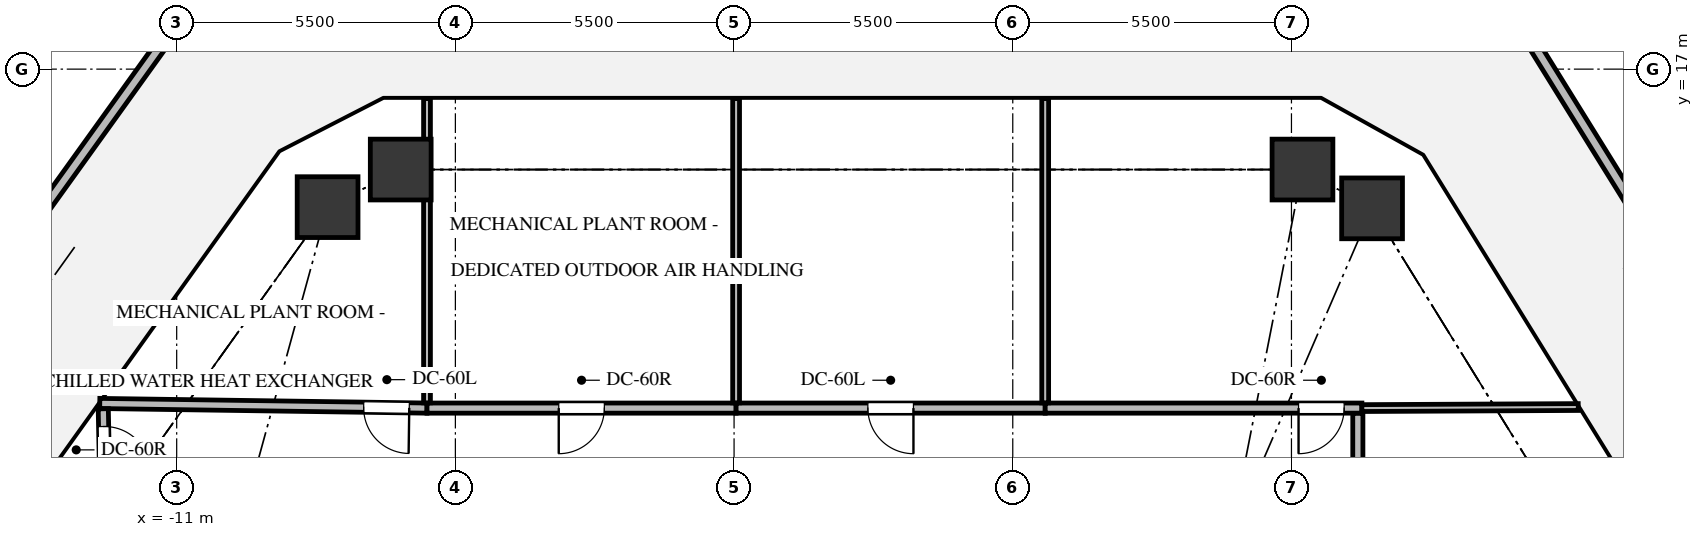
"""IFC4 building model, lengths in metres.
Left out: names, types, materials, properties, quantities, classifications, styles, units other than length and angle.
Written with IfcOpenShell. Run it as: python <this file> out.ifc"""

import sys

from ifc_helpers import new_model, si_unit, direction, frame, frame_2d, origin, origin_2d, place, context, subcontext, project, spatial, rectangle, extrude, source, transform, mapped, element, fill, save


model = new_model("IFC4")
c1 = context("Model", 3, precision=1e-05, world=origin(), true_north=direction((0.0, 1.0)))
c2 = subcontext(c1, "Body", "Model", "MODEL_VIEW")
j1 = project(units=[si_unit("LENGTHUNIT", "METRE"), si_unit("PLANEANGLEUNIT", "RADIAN")], contexts=[c1])
p1 = place(None, origin())
s1 = spatial("IfcSite", under=j1, at=p1, CompositionType="ELEMENT")
p2 = place(p1, origin())
s2 = spatial("IfcBuilding", under=s1, at=p2, CompositionType="ELEMENT")
p3 = place(p2, frame((0.0, 0.0, 150.3)))
s3 = spatial("IfcBuildingStorey", under=s2, at=p3, CompositionType="ELEMENT", Elevation=150.3)
m1 = source(origin(), c2, "Body", "SweptSolid", [
    extrude(rectangle(XDim=1.2, YDim=1.2, at=origin_2d()), origin(), (0.0, 0.0, 1.0), 4.8),
])
for number, where, z_axis, x_axis in (
    (1, (-8.022, 14.276, -0.32), (0.0, 0.0, 1.0), (1.0, 0.0, 0.0)),
    (2, (-6.579, 15.018, -0.32), (0.0, 0.0, 1.0), (1.0, 0.0, 0.0)),
    (3, (11.218, 15.018, -0.32), (0.0, 0.0, 1.0), (1.0, 0.0, 0.0)),
    (4, (12.591, 14.252, -0.32), (0.0, 0.0, 1.0), (1.0, 0.0, 0.0)),
):
    element("IfcColumn", number, at=place(p3, frame(where, z_axis=z_axis, x_axis=x_axis)), inside=s3, PredefinedType="COLUMN", context=c2, shape_type="MappedRepresentation", body=[
        mapped(m1, transform((0.0, 0.0, 0.0), x_axis=(1.0, 0.0, 0.0), y_axis=(0.0, 1.0, 0.0), z_axis=(0.0, 0.0, 1.0), scale=1.0)),
    ])
p4 = place(p3, frame((-21.326, 3.526, 0.0), z_axis=(0.0, 0.0, 1.0), x_axis=(0.583446750611, 0.812151395493, 0.0)))
e5 = element("IfcWall", 5, at=p4, inside=s3, PredefinedType="PARAPET", context=c2, shape_type="SweptSolid", body=[
    extrude(rectangle(XDim=19.587, YDim=0.22, at=frame_2d((9.794, 0.0))), origin(), (0.0, 0.0, 1.0), 1.2),
])
p5 = place(p3, frame((14.612, 19.366, 0.0), z_axis=(0.0, 0.0, 1.0), x_axis=(0.527101579679, -0.849802285652, 0.0)))
e6 = element("IfcWall", 6, at=p5, inside=s3, PredefinedType="PARAPET", context=c2, shape_type="SweptSolid", body=[
    extrude(rectangle(XDim=19.866, YDim=0.22, at=frame_2d((9.933, 0.0))), origin(), (0.0, 0.0, 1.0), 1.2),
])
p6 = place(p3, frame((-6.06, 10.31, 0.0), z_axis=(0.0, 0.0, 1.0), x_axis=(-0.999899519245, 0.014175733232, 0.0)))
e7 = element("IfcWall", 7, at=p6, inside=s3, PredefinedType="SOLIDWALL", context=c2, shape_type="SweptSolid", body=[
    extrude(rectangle(XDim=6.458, YDim=0.2, at=frame_2d((3.229, 0.0))), origin(), (0.0, 0.0, 1.0), 3.662),
])
p7 = place(p6, frame((0.35, 0.0, 0.0)))
e8 = element("IfcOpeningElement", 8, at=p7, cuts=e7, PredefinedType="OPENING", context=c2, shape_type="SweptSolid", body=[
    extrude(rectangle(XDim=0.9, YDim=2.05, at=frame_2d((0.45, 1.025))), frame((0.0, 0.11, 0.0), z_axis=(0.0, -1.0, 0.0), x_axis=(1.0, 0.0, 0.0)), (0.0, 0.0, 1.0), 0.22),
])
p8 = place(p3, frame((0.04, 10.31, 0.0), z_axis=(0.0, 0.0, 1.0), x_axis=(-1.0, 0.0, 0.0)))
e9 = element("IfcWall", 9, at=p8, inside=s3, PredefinedType="SOLIDWALL", context=c2, shape_type="SweptSolid", body=[
    extrude(rectangle(XDim=6.1, YDim=0.2, at=frame_2d((3.05, 0.0))), origin(), (0.0, 0.0, 1.0), 4.028),
])
p9 = place(p8, frame((2.6, 0.0, 0.0)))
e10 = element("IfcOpeningElement", 10, at=p9, cuts=e9, PredefinedType="OPENING", context=c2, shape_type="SweptSolid", body=[
    extrude(rectangle(XDim=0.9, YDim=2.05, at=frame_2d((0.45, 1.025))), frame((0.0, 0.11, 0.0), z_axis=(0.0, -1.0, 0.0), x_axis=(1.0, 0.0, 0.0)), (0.0, 0.0, 1.0), 0.22),
])
p10 = place(p3, frame((6.14, 10.31, 0.0), z_axis=(0.0, 0.0, 1.0), x_axis=(-1.0, 0.0, 0.0)))
e11 = element("IfcWall", 11, at=p10, inside=s3, PredefinedType="SOLIDWALL", context=c2, shape_type="SweptSolid", body=[
    extrude(rectangle(XDim=6.1, YDim=0.2, at=frame_2d((3.05, 0.0))), origin(), (0.0, 0.0, 1.0), 4.028),
])
p11 = place(p10, frame((2.6, 0.0, 0.0)))
e12 = element("IfcOpeningElement", 12, at=p11, cuts=e11, PredefinedType="OPENING", context=c2, shape_type="SweptSolid", body=[
    extrude(rectangle(XDim=0.9, YDim=2.05, at=frame_2d((0.45, 1.025))), frame((0.0, 0.11, 0.0), z_axis=(0.0, -1.0, 0.0), x_axis=(1.0, 0.0, 0.0)), (0.0, 0.0, 1.0), 0.22),
])
p12 = place(p3, frame((12.39, 10.31, 0.0), z_axis=(0.0, 0.0, 1.0), x_axis=(-1.0, 0.0, 0.0)))
e13 = element("IfcWall", 13, at=p12, inside=s3, PredefinedType="SOLIDWALL", context=c2, shape_type="SweptSolid", body=[
    extrude(rectangle(XDim=6.25, YDim=0.2, at=frame_2d((3.125, 0.0))), origin(), (0.0, 0.0, 1.0), 3.662),
])
p13 = place(p12, frame((0.35, 0.0, 0.0)))
e14 = element("IfcOpeningElement", 14, at=p13, cuts=e13, PredefinedType="OPENING", context=c2, shape_type="SweptSolid", body=[
    extrude(rectangle(XDim=0.9, YDim=2.05, at=frame_2d((0.45, 1.025))), frame((0.0, 0.11, 0.0), z_axis=(0.0, -1.0, 0.0), x_axis=(1.0, 0.0, 0.0)), (0.0, 0.0, 1.0), 0.22),
])
p14 = place(p3, frame((12.31, 3.49, 0.0), z_axis=(0.0, 0.0, 1.0), x_axis=(0.0, 1.0, 0.0)))
e15 = element("IfcWall", 15, at=p14, inside=s3, PredefinedType="SOLIDWALL", context=c2, shape_type="SweptSolid", body=[
    extrude(rectangle(XDim=6.716, YDim=0.2, at=frame_2d((3.358, 0.0))), origin(), (0.0, 0.0, 1.0), 4.465),
])
p15 = place(p14, frame((0.35, 0.0, 0.0)))
e16 = element("IfcOpeningElement", 16, at=p15, cuts=e15, PredefinedType="OPENING", context=c2, shape_type="SweptSolid", body=[
    extrude(rectangle(XDim=0.9, YDim=2.05, at=frame_2d((0.45, 1.025))), frame((0.0, 0.11, 0.0), z_axis=(0.0, -1.0, 0.0), x_axis=(1.0, 0.0, 0.0)), (0.0, 0.0, 1.0), 0.22),
])
p16 = place(p3, frame((-12.449, 10.296, 0.0), z_axis=(0.0, 0.0, 1.0), x_axis=(0.020190295039, -0.999796155217, 0.0)))
e17 = element("IfcWall", 17, at=p16, inside=s3, PredefinedType="SOLIDWALL", context=c2, shape_type="SweptSolid", body=[
    extrude(rectangle(XDim=6.808, YDim=0.2, at=frame_2d((3.404, 0.0))), origin(), (0.0, 0.0, 1.0), 3.819),
])
p17 = place(p16, frame((0.35, 0.0, 0.0)))
e18 = element("IfcOpeningElement", 18, at=p17, cuts=e17, PredefinedType="OPENING", context=c2, shape_type="SweptSolid", body=[
    extrude(rectangle(XDim=0.9, YDim=2.05, at=frame_2d((0.45, 1.025))), frame((0.0, 0.11, 0.0), z_axis=(0.0, -1.0, 0.0), x_axis=(1.0, 0.0, 0.0)), (0.0, 0.0, 1.0), 0.22),
])
for number, where, z_axis, x_axis in (
    (19, (-6.06, 16.418, 0.0), (0.0, 0.0, 1.0), (0.0, -1.0, 0.0)),
    (20, (0.04, 16.418, 0.0), (0.0, 0.0, 1.0), (0.0, -1.0, 0.0)),
    (21, (6.14, 16.418, 0.0), (0.0, 0.0, 1.0), (0.0, -1.0, 0.0)),
):
    element("IfcWall", number, at=place(p3, frame(where, z_axis=z_axis, x_axis=x_axis)), inside=s3, PredefinedType="PARTITIONING", context=c2, shape_type="SweptSolid", body=[
        extrude(rectangle(XDim=6.004, YDim=0.135, at=frame_2d((3.002, 0.0))), origin(), (0.0, 0.0, 1.0), 3.819),
    ])
p18 = place(p3, frame((16.66, 10.331, 0.0), z_axis=(0.0, 0.0, 1.0), x_axis=(-0.999988189448, -0.004860140437, 0.0)))
e22 = element("IfcWall", 22, at=p18, inside=s3, PredefinedType="PARTITIONING", context=c2, shape_type="SweptSolid", body=[
    extrude(rectangle(XDim=4.27, YDim=0.135, at=frame_2d((2.135, 0.0))), origin(), (0.0, 0.0, 1.0), 3.819),
])
m2 = source(origin(), c2, "Body", "SweptSolid", [
    extrude(rectangle(XDim=0.9, YDim=2.05, at=frame_2d((0.45, 1.025))), frame((0.0, 0.025, 0.0), z_axis=(0.0, -1.0, 0.0), x_axis=(1.0, 0.0, 0.0)), (0.0, 0.0, 1.0), 0.05),
])
p19 = place(p7, origin())
e23 = element("IfcDoor", 23, at=p19, inside=s3, OperationType="SINGLE_SWING_LEFT", PredefinedType="DOOR", context=c2, shape_type="MappedRepresentation", body=[
    mapped(m2, transform((0.0, 0.0, 0.0), x_axis=(1.0, 0.0, 0.0), y_axis=(0.0, 1.0, 0.0), z_axis=(0.0, 0.0, 1.0), scale=1.0)),
])
fill(e8, e23)
m3 = source(origin(), c2, "Body", "SweptSolid", [
    extrude(rectangle(XDim=0.9, YDim=2.05, at=frame_2d((0.45, 1.025))), frame((0.0, 0.025, 0.0), z_axis=(0.0, -1.0, 0.0), x_axis=(1.0, 0.0, 0.0)), (0.0, 0.0, 1.0), 0.05),
])
p20 = place(p9, origin())
e24 = element("IfcDoor", 24, at=p20, inside=s3, OperationType="SINGLE_SWING_RIGHT", PredefinedType="DOOR", context=c2, shape_type="MappedRepresentation", body=[
    mapped(m3, transform((0.0, 0.0, 0.0), x_axis=(1.0, 0.0, 0.0), y_axis=(0.0, 1.0, 0.0), z_axis=(0.0, 0.0, 1.0), scale=1.0)),
])
fill(e10, e24)
p21 = place(p11, origin())
e25 = element("IfcDoor", 25, at=p21, inside=s3, OperationType="SINGLE_SWING_LEFT", PredefinedType="DOOR", context=c2, shape_type="MappedRepresentation", body=[
    mapped(m2, transform((0.0, 0.0, 0.0), x_axis=(1.0, 0.0, 0.0), y_axis=(0.0, 1.0, 0.0), z_axis=(0.0, 0.0, 1.0), scale=1.0)),
])
fill(e12, e25)
p22 = place(p13, origin())
e26 = element("IfcDoor", 26, at=p22, inside=s3, OperationType="SINGLE_SWING_RIGHT", PredefinedType="DOOR", context=c2, shape_type="MappedRepresentation", body=[
    mapped(m3, transform((0.0, 0.0, 0.0), x_axis=(1.0, 0.0, 0.0), y_axis=(0.0, 1.0, 0.0), z_axis=(0.0, 0.0, 1.0), scale=1.0)),
])
fill(e14, e26)
p23 = place(p17, origin())
e27 = element("IfcDoor", 27, at=p23, inside=s3, OperationType="SINGLE_SWING_RIGHT", PredefinedType="DOOR", context=c2, shape_type="MappedRepresentation", body=[
    mapped(m3, transform((0.0, 0.0, 0.0), x_axis=(1.0, 0.0, 0.0), y_axis=(0.0, 1.0, 0.0), z_axis=(0.0, 0.0, 1.0), scale=1.0)),
])
fill(e18, e27)
save(model, sys.argv[1])
